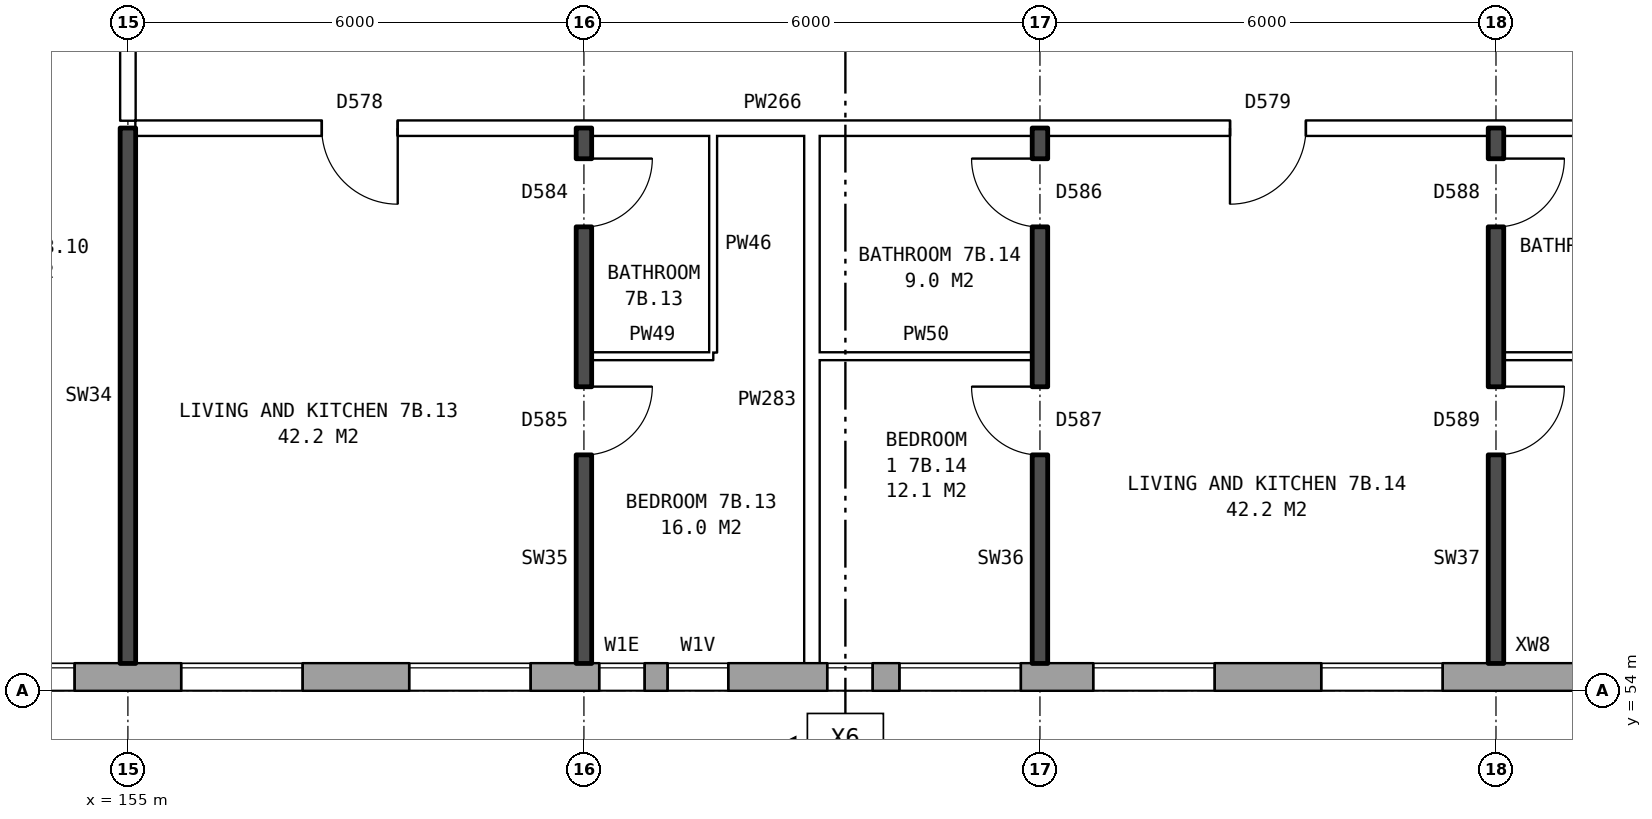
"""IFC4 building model, lengths in metres.
Left out: names, types, materials, properties, quantities, classifications, styles, units other than length and angle.
Written with IfcOpenShell. Run it as: python <this file> out.ifc"""

import sys

from ifc_helpers import new_model, si_unit, direction, frame, frame_2d, origin, place, context, subcontext, project, spatial, rectangle, extrude, element, fill, save


model = new_model("IFC4")
c1 = context("Model", 3, precision=1e-05, world=origin(), true_north=direction((0.0, 1.0)))
c2 = subcontext(c1, "Body", "Model", "MODEL_VIEW")
j1 = project(units=[si_unit("LENGTHUNIT", "METRE"), si_unit("PLANEANGLEUNIT", "RADIAN")], contexts=[c1])
p1 = place(None, origin())
s1 = spatial("IfcSite", under=j1, at=p1, CompositionType="ELEMENT")
p2 = place(p1, origin())
s2 = spatial("IfcBuilding", under=s1, at=p2, CompositionType="ELEMENT")
p3 = place(p2, frame((0.0, 0.0, 28.8)))
s3 = spatial("IfcBuildingStorey", under=s2, at=p3, CompositionType="ELEMENT", Elevation=28.8)
p4 = place(p3, frame((134.075, 54.18, 0.0), z_axis=(0.0, 0.0, 1.0), x_axis=(1.0, 0.0, 0.0)))
e1 = element("IfcWall", 1, at=p4, inside=s3, PredefinedType="STANDARD", context=c2, shape_type="SweptSolid", body=[
    extrude(rectangle(XDim=40.601, YDim=0.36, at=frame_2d((20.3, 0.0))), origin(), (0.0, 0.0, 1.0), 2.85),
])
p5 = place(p4, frame((0.625, 0.0, 0.8)))
e2 = element("IfcOpeningElement", 2, at=p5, cuts=e1, PredefinedType="OPENING", context=c2, shape_type="SweptSolid", body=[
    extrude(rectangle(XDim=1.6, YDim=1.8, at=frame_2d((0.8, 0.9))), frame((0.0, 0.19, 0.0), z_axis=(0.0, -1.0, 0.0), x_axis=(1.0, 0.0, 0.0)), (0.0, 0.0, 1.0), 0.38),
])
p6 = place(p4, frame((3.625, 0.0, 0.8)))
e3 = element("IfcOpeningElement", 3, at=p6, cuts=e1, PredefinedType="OPENING", context=c2, shape_type="SweptSolid", body=[
    extrude(rectangle(XDim=1.6, YDim=1.8, at=frame_2d((0.8, 0.9))), frame((0.0, 0.19, 0.0), z_axis=(0.0, -1.0, 0.0), x_axis=(1.0, 0.0, 0.0)), (0.0, 0.0, 1.0), 0.38),
])
p7 = place(p4, frame((6.625, 0.0, 0.8)))
e4 = element("IfcOpeningElement", 4, at=p7, cuts=e1, PredefinedType="OPENING", context=c2, shape_type="SweptSolid", body=[
    extrude(rectangle(XDim=1.6, YDim=1.8, at=frame_2d((0.8, 0.9))), frame((0.0, 0.19, 0.0), z_axis=(0.0, -1.0, 0.0), x_axis=(1.0, 0.0, 0.0)), (0.0, 0.0, 1.0), 0.38),
])
p8 = place(p4, frame((9.125, 0.0, 1.65)))
e5 = element("IfcOpeningElement", 5, at=p8, cuts=e1, PredefinedType="OPENING", context=c2, shape_type="SweptSolid", body=[
    extrude(rectangle(XDim=1.4, YDim=0.9, at=frame_2d((0.7, 0.45))), frame((0.0, 0.19, 0.0), z_axis=(0.0, -1.0, 0.0), x_axis=(1.0, 0.0, 0.0)), (0.0, 0.0, 1.0), 0.38),
])
p9 = place(p4, frame((12.075, 0.0, 0.8)))
e6 = element("IfcOpeningElement", 6, at=p9, cuts=e1, PredefinedType="OPENING", context=c2, shape_type="SweptSolid", body=[
    extrude(rectangle(XDim=0.6, YDim=0.9, at=frame_2d((0.3, 0.45))), frame((0.0, 0.19, 0.0), z_axis=(0.0, -1.0, 0.0), x_axis=(1.0, 0.0, 0.0)), (0.0, 0.0, 1.0), 0.38),
])
p10 = place(p4, frame((15.625, 0.0, 0.8)))
e7 = element("IfcOpeningElement", 7, at=p10, cuts=e1, PredefinedType="OPENING", context=c2, shape_type="SweptSolid", body=[
    extrude(rectangle(XDim=1.6, YDim=1.8, at=frame_2d((0.8, 0.9))), frame((0.0, 0.19, 0.0), z_axis=(0.0, -1.0, 0.0), x_axis=(1.0, 0.0, 0.0)), (0.0, 0.0, 1.0), 0.38),
])
p11 = place(p4, frame((18.625, 0.0, 0.8)))
e8 = element("IfcOpeningElement", 8, at=p11, cuts=e1, PredefinedType="OPENING", context=c2, shape_type="SweptSolid", body=[
    extrude(rectangle(XDim=1.6, YDim=1.8, at=frame_2d((0.8, 0.9))), frame((0.0, 0.19, 0.0), z_axis=(0.0, -1.0, 0.0), x_axis=(1.0, 0.0, 0.0)), (0.0, 0.0, 1.0), 0.38),
])
p12 = place(p4, frame((21.625, 0.0, 0.8)))
e9 = element("IfcOpeningElement", 9, at=p12, cuts=e1, PredefinedType="OPENING", context=c2, shape_type="SweptSolid", body=[
    extrude(rectangle(XDim=1.6, YDim=1.8, at=frame_2d((0.8, 0.9))), frame((0.0, 0.19, 0.0), z_axis=(0.0, -1.0, 0.0), x_axis=(1.0, 0.0, 0.0)), (0.0, 0.0, 1.0), 0.38),
])
p13 = place(p4, frame((24.625, 0.0, 0.8)))
e10 = element("IfcOpeningElement", 10, at=p13, cuts=e1, PredefinedType="OPENING", context=c2, shape_type="SweptSolid", body=[
    extrude(rectangle(XDim=1.6, YDim=1.8, at=frame_2d((0.8, 0.9))), frame((0.0, 0.19, 0.0), z_axis=(0.0, -1.0, 0.0), x_axis=(1.0, 0.0, 0.0)), (0.0, 0.0, 1.0), 0.38),
])
p14 = place(p4, frame((27.125, 0.0, 0.65)))
e11 = element("IfcOpeningElement", 11, at=p14, cuts=e1, PredefinedType="OPENING", context=c2, shape_type="SweptSolid", body=[
    extrude(rectangle(XDim=0.6, YDim=1.8, at=frame_2d((0.3, 0.9))), frame((0.0, 0.19, 0.0), z_axis=(0.0, -1.0, 0.0), x_axis=(1.0, 0.0, 0.0)), (0.0, 0.0, 1.0), 0.38),
])
p15 = place(p4, frame((30.125, 0.0, 1.6)))
e12 = element("IfcOpeningElement", 12, at=p15, cuts=e1, PredefinedType="OPENING", context=c2, shape_type="SweptSolid", body=[
    extrude(rectangle(XDim=0.6, YDim=0.9, at=frame_2d((0.3, 0.45))), frame((0.0, 0.19, 0.0), z_axis=(0.0, -1.0, 0.0), x_axis=(1.0, 0.0, 0.0)), (0.0, 0.0, 1.0), 0.38),
])
p16 = place(p4, frame((33.625, 0.0, 0.8)))
e13 = element("IfcOpeningElement", 13, at=p16, cuts=e1, PredefinedType="OPENING", context=c2, shape_type="SweptSolid", body=[
    extrude(rectangle(XDim=1.6, YDim=1.8, at=frame_2d((0.8, 0.9))), frame((0.0, 0.19, 0.0), z_axis=(0.0, -1.0, 0.0), x_axis=(1.0, 0.0, 0.0)), (0.0, 0.0, 1.0), 0.38),
])
p17 = place(p4, frame((36.625, 0.0, 0.8)))
e14 = element("IfcOpeningElement", 14, at=p17, cuts=e1, PredefinedType="OPENING", context=c2, shape_type="SweptSolid", body=[
    extrude(rectangle(XDim=1.6, YDim=1.8, at=frame_2d((0.8, 0.9))), frame((0.0, 0.19, 0.0), z_axis=(0.0, -1.0, 0.0), x_axis=(1.0, 0.0, 0.0)), (0.0, 0.0, 1.0), 0.38),
])
p18 = place(p4, frame((11.075, 0.0, 0.15)))
e15 = element("IfcOpeningElement", 15, at=p18, cuts=e1, PredefinedType="OPENING", context=c2, shape_type="SweptSolid", body=[
    extrude(rectangle(XDim=0.6, YDim=0.9, at=frame_2d((0.3, 0.45))), frame((0.0, 0.19, 0.0), z_axis=(0.0, -1.0, 0.0), x_axis=(1.0, 0.0, 0.0)), (0.0, 0.0, 1.0), 0.38),
])
p19 = place(p4, frame((13.025, 0.0, 0.8)))
e16 = element("IfcOpeningElement", 16, at=p19, cuts=e1, PredefinedType="OPENING", context=c2, shape_type="SweptSolid", body=[
    extrude(rectangle(XDim=1.6, YDim=1.8, at=frame_2d((0.8, 0.9))), frame((0.0, 0.19, 0.0), z_axis=(0.0, -1.0, 0.0), x_axis=(1.0, 0.0, 0.0)), (0.0, 0.0, 1.0), 0.38),
])
p20 = place(p4, frame((28.025, 0.0, 0.65)))
e17 = element("IfcOpeningElement", 17, at=p20, cuts=e1, PredefinedType="OPENING", context=c2, shape_type="SweptSolid", body=[
    extrude(rectangle(XDim=0.8, YDim=0.9, at=frame_2d((0.4, 0.45))), frame((0.0, 0.19, 0.0), z_axis=(0.0, -1.0, 0.0), x_axis=(1.0, 0.0, 0.0)), (0.0, 0.0, 1.0), 0.38),
])
p21 = place(p4, frame((31.075, 0.0, 0.8)))
e18 = element("IfcOpeningElement", 18, at=p21, cuts=e1, PredefinedType="OPENING", context=c2, shape_type="SweptSolid", body=[
    extrude(rectangle(XDim=1.6, YDim=1.8, at=frame_2d((0.8, 0.9))), frame((0.0, 0.19, 0.0), z_axis=(0.0, -1.0, 0.0), x_axis=(1.0, 0.0, 0.0)), (0.0, 0.0, 1.0), 0.38),
])
p22 = place(p3, frame((161.1, 58.4, 0.0), z_axis=(0.0, 0.0, 1.0), x_axis=(1.0, 0.0, 0.0)))
e19 = element("IfcWall", 19, at=p22, inside=s3, PredefinedType="PARTITIONING", context=c2, shape_type="SweptSolid", body=[
    extrude(rectangle(XDim=1.6, YDim=0.1, at=frame_2d((0.8, 0.0))), origin(), (0.0, 0.0, 1.0), 2.85),
])
p23 = place(p3, frame((164.1, 58.4, 0.0), z_axis=(0.0, 0.0, 1.0), x_axis=(1.0, 0.0, 0.0)))
e20 = element("IfcWall", 20, at=p23, inside=s3, PredefinedType="PARTITIONING", context=c2, shape_type="SweptSolid", body=[
    extrude(rectangle(XDim=2.8, YDim=0.1, at=frame_2d((1.4, 0.0))), origin(), (0.0, 0.0, 1.0), 2.85),
])
p24 = place(p3, frame((173.1, 58.4, 0.0), z_axis=(0.0, 0.0, 1.0), x_axis=(1.0, 0.0, 0.0)))
e21 = element("IfcWall", 21, at=p24, inside=s3, PredefinedType="PARTITIONING", context=c2, shape_type="SweptSolid", body=[
    extrude(rectangle(XDim=2.9, YDim=0.1, at=frame_2d((1.45, 0.0))), origin(), (0.0, 0.0, 1.0), 2.85),
])
p25 = place(p3, frame((155.1, 61.4, 0.0), z_axis=(0.0, 0.0, 1.0), x_axis=(1.0, 0.0, 0.0)))
e22 = element("IfcWall", 22, at=p25, inside=s3, PredefinedType="PARTITIONING", context=c2, shape_type="SweptSolid", body=[
    extrude(rectangle(XDim=22.29, YDim=0.2, at=frame_2d((11.145, 0.0))), origin(), (0.0, 0.0, 1.0), 2.85),
])
p26 = place(p25, frame((2.45, 0.0, 0.0)))
e23 = element("IfcOpeningElement", 23, at=p26, cuts=e22, PredefinedType="OPENING", context=c2, shape_type="SweptSolid", body=[
    extrude(rectangle(XDim=1.0, YDim=2.1, at=frame_2d((0.5, 1.05))), frame((0.0, 0.11, 0.0), z_axis=(0.0, -1.0, 0.0), x_axis=(1.0, 0.0, 0.0)), (0.0, 0.0, 1.0), 0.22),
])
p27 = place(p25, frame((14.4, 0.0, 0.0)))
e24 = element("IfcOpeningElement", 24, at=p27, cuts=e22, PredefinedType="OPENING", context=c2, shape_type="SweptSolid", body=[
    extrude(rectangle(XDim=1.0, YDim=2.1, at=frame_2d((0.5, 1.05))), frame((0.0, 0.11, 0.0), z_axis=(0.0, -1.0, 0.0), x_axis=(1.0, 0.0, 0.0)), (0.0, 0.0, 1.0), 0.22),
])
p28 = place(p3, frame((155.0, 54.36, 0.0), z_axis=(0.0, 0.0, 1.0), x_axis=(0.0, 1.0, 0.0)))
e25 = element("IfcWall", 25, at=p28, inside=s3, PredefinedType="SOLIDWALL", context=c2, shape_type="SweptSolid", body=[
    extrude(rectangle(XDim=7.04, YDim=0.2, at=frame_2d((3.52, 0.0))), origin(), (0.0, 0.0, 1.0), 2.85),
])
p29 = place(p3, frame((155.0, 61.5, 0.0), z_axis=(0.0, 0.0, 1.0), x_axis=(0.0, 1.0, 0.0)))
e26 = element("IfcWall", 26, at=p29, inside=s3, PredefinedType="PARTITIONING", context=c2, shape_type="SweptSolid", body=[
    extrude(rectangle(XDim=2.2, YDim=0.2, at=frame_2d((1.1, 0.0))), origin(), (0.0, 0.0, 1.0), 2.85),
])
p30 = place(p3, frame((161.0, 54.36, 0.0), z_axis=(0.0, 0.0, 1.0), x_axis=(0.0, 1.0, 0.0)))
e27 = element("IfcWall", 27, at=p30, inside=s3, PredefinedType="SOLIDWALL", context=c2, shape_type="SweptSolid", body=[
    extrude(rectangle(XDim=7.04, YDim=0.2, at=frame_2d((3.52, 0.0))), origin(), (0.0, 0.0, 1.0), 2.85),
])
p31 = place(p30, frame((2.74, 0.0, 0.0)))
e28 = element("IfcOpeningElement", 28, at=p31, cuts=e27, PredefinedType="OPENING", context=c2, shape_type="SweptSolid", body=[
    extrude(rectangle(XDim=0.9, YDim=2.1, at=frame_2d((0.45, 1.05))), frame((0.0, 0.11, 0.0), z_axis=(0.0, -1.0, 0.0), x_axis=(1.0, 0.0, 0.0)), (0.0, 0.0, 1.0), 0.22),
])
p32 = place(p30, frame((5.74, 0.0, 0.0)))
e29 = element("IfcOpeningElement", 29, at=p32, cuts=e27, PredefinedType="OPENING", context=c2, shape_type="SweptSolid", body=[
    extrude(rectangle(XDim=0.9, YDim=2.1, at=frame_2d((0.45, 1.05))), frame((0.0, 0.11, 0.0), z_axis=(0.0, -1.0, 0.0), x_axis=(1.0, 0.0, 0.0)), (0.0, 0.0, 1.0), 0.22),
])
p33 = place(p3, frame((162.7, 58.45, 0.0), z_axis=(0.0, 0.0, 1.0), x_axis=(0.0, 1.0, 0.0)))
e30 = element("IfcWall", 30, at=p33, inside=s3, PredefinedType="PARTITIONING", context=c2, shape_type="SweptSolid", body=[
    extrude(rectangle(XDim=2.85, YDim=0.1, at=frame_2d((1.425, 0.0))), origin(), (0.0, 0.0, 1.0), 2.85),
])
p34 = place(p3, frame((164.0, 54.36, 0.0), z_axis=(0.0, 0.0, 1.0), x_axis=(0.0, 1.0, 0.0)))
e31 = element("IfcWall", 31, at=p34, inside=s3, PredefinedType="PARTITIONING", context=c2, shape_type="SweptSolid", body=[
    extrude(rectangle(XDim=6.94, YDim=0.2, at=frame_2d((3.47, 0.0))), origin(), (0.0, 0.0, 1.0), 2.85),
])
p35 = place(p3, frame((167.0, 54.36, 0.0), z_axis=(0.0, 0.0, 1.0), x_axis=(0.0, 1.0, 0.0)))
e32 = element("IfcWall", 32, at=p35, inside=s3, PredefinedType="SOLIDWALL", context=c2, shape_type="SweptSolid", body=[
    extrude(rectangle(XDim=7.04, YDim=0.2, at=frame_2d((3.52, 0.0))), origin(), (0.0, 0.0, 1.0), 2.85),
])
p36 = place(p35, frame((2.74, 0.0, 0.0)))
e33 = element("IfcOpeningElement", 33, at=p36, cuts=e32, PredefinedType="OPENING", context=c2, shape_type="SweptSolid", body=[
    extrude(rectangle(XDim=0.9, YDim=2.1, at=frame_2d((0.45, 1.05))), frame((0.0, 0.11, 0.0), z_axis=(0.0, -1.0, 0.0), x_axis=(1.0, 0.0, 0.0)), (0.0, 0.0, 1.0), 0.22),
])
p37 = place(p35, frame((5.74, 0.0, 0.0)))
e34 = element("IfcOpeningElement", 34, at=p37, cuts=e32, PredefinedType="OPENING", context=c2, shape_type="SweptSolid", body=[
    extrude(rectangle(XDim=0.9, YDim=2.1, at=frame_2d((0.45, 1.05))), frame((0.0, 0.11, 0.0), z_axis=(0.0, -1.0, 0.0), x_axis=(1.0, 0.0, 0.0)), (0.0, 0.0, 1.0), 0.22),
])
p38 = place(p3, frame((173.0, 54.36, 0.0), z_axis=(0.0, 0.0, 1.0), x_axis=(0.0, 1.0, 0.0)))
e35 = element("IfcWall", 35, at=p38, inside=s3, PredefinedType="SOLIDWALL", context=c2, shape_type="SweptSolid", body=[
    extrude(rectangle(XDim=7.04, YDim=0.2, at=frame_2d((3.52, 0.0))), origin(), (0.0, 0.0, 1.0), 2.85),
])
p39 = place(p38, frame((2.74, 0.0, 0.0)))
e36 = element("IfcOpeningElement", 36, at=p39, cuts=e35, PredefinedType="OPENING", context=c2, shape_type="SweptSolid", body=[
    extrude(rectangle(XDim=0.9, YDim=2.1, at=frame_2d((0.45, 1.05))), frame((0.0, 0.11, 0.0), z_axis=(0.0, -1.0, 0.0), x_axis=(1.0, 0.0, 0.0)), (0.0, 0.0, 1.0), 0.22),
])
p40 = place(p38, frame((5.74, 0.0, 0.0)))
e37 = element("IfcOpeningElement", 37, at=p40, cuts=e35, PredefinedType="OPENING", context=c2, shape_type="SweptSolid", body=[
    extrude(rectangle(XDim=0.9, YDim=2.1, at=frame_2d((0.45, 1.05))), frame((0.0, 0.11, 0.0), z_axis=(0.0, -1.0, 0.0), x_axis=(1.0, 0.0, 0.0)), (0.0, 0.0, 1.0), 0.22),
])
p41 = place(p11, origin())
e38 = element("IfcWindow", 38, at=p41, inside=s3, PartitioningType="SINGLE_PANEL", PredefinedType="WINDOW", context=c2, shape_type="SweptSolid", body=[
    extrude(rectangle(XDim=1.6, YDim=1.8, at=frame_2d((0.8, 0.9))), frame((0.0, 0.15, 0.0), z_axis=(0.0, -1.0, 0.0), x_axis=(1.0, 0.0, 0.0)), (0.0, 0.0, 1.0), 0.06),
])
fill(e8, e38)
p42 = place(p12, origin())
e39 = element("IfcWindow", 39, at=p42, inside=s3, PartitioningType="SINGLE_PANEL", PredefinedType="WINDOW", context=c2, shape_type="SweptSolid", body=[
    extrude(rectangle(XDim=1.6, YDim=1.8, at=frame_2d((0.8, 0.9))), frame((0.0, 0.15, 0.0), z_axis=(0.0, -1.0, 0.0), x_axis=(1.0, 0.0, 0.0)), (0.0, 0.0, 1.0), 0.06),
])
fill(e9, e39)
p43 = place(p13, origin())
e40 = element("IfcWindow", 40, at=p43, inside=s3, PartitioningType="SINGLE_PANEL", PredefinedType="WINDOW", context=c2, shape_type="SweptSolid", body=[
    extrude(rectangle(XDim=1.6, YDim=1.8, at=frame_2d((0.8, 0.9))), frame((0.0, 0.15, 0.0), z_axis=(0.0, -1.0, 0.0), x_axis=(1.0, 0.0, 0.0)), (0.0, 0.0, 1.0), 0.06),
])
fill(e10, e40)
p44 = place(p14, origin())
e41 = element("IfcWindow", 41, at=p44, inside=s3, PartitioningType="SINGLE_PANEL", PredefinedType="WINDOW", context=c2, shape_type="SweptSolid", body=[
    extrude(rectangle(XDim=0.6, YDim=1.8, at=frame_2d((0.3, 0.9))), frame((0.0, 0.15, 0.0), z_axis=(0.0, -1.0, 0.0), x_axis=(1.0, 0.0, 0.0)), (0.0, 0.0, 1.0), 0.06),
])
fill(e11, e41)
p45 = place(p15, origin())
e42 = element("IfcWindow", 42, at=p45, inside=s3, PartitioningType="SINGLE_PANEL", PredefinedType="WINDOW", context=c2, shape_type="SweptSolid", body=[
    extrude(rectangle(XDim=0.6, YDim=0.9, at=frame_2d((0.3, 0.45))), frame((0.0, 0.15, 0.0), z_axis=(0.0, -1.0, 0.0), x_axis=(1.0, 0.0, 0.0)), (0.0, 0.0, 1.0), 0.06),
])
fill(e12, e42)
p46 = place(p16, origin())
e43 = element("IfcWindow", 43, at=p46, inside=s3, PartitioningType="SINGLE_PANEL", PredefinedType="WINDOW", context=c2, shape_type="SweptSolid", body=[
    extrude(rectangle(XDim=1.6, YDim=1.8, at=frame_2d((0.8, 0.9))), frame((0.0, 0.15, 0.0), z_axis=(0.0, -1.0, 0.0), x_axis=(1.0, 0.0, 0.0)), (0.0, 0.0, 1.0), 0.06),
])
fill(e13, e43)
p47 = place(p17, origin())
e44 = element("IfcWindow", 44, at=p47, inside=s3, PartitioningType="SINGLE_PANEL", PredefinedType="WINDOW", context=c2, shape_type="SweptSolid", body=[
    extrude(rectangle(XDim=1.6, YDim=1.8, at=frame_2d((0.8, 0.9))), frame((0.0, 0.15, 0.0), z_axis=(0.0, -1.0, 0.0), x_axis=(1.0, 0.0, 0.0)), (0.0, 0.0, 1.0), 0.06),
])
fill(e14, e44)
p48 = place(p31, frame((0.9, 0.0, 0.0), z_axis=(0.0, 0.0, 1.0), x_axis=(-1.0, 0.0, 0.0)))
e45 = element("IfcDoor", 45, at=p48, inside=s3, OperationType="SINGLE_SWING_LEFT", PredefinedType="DOOR", context=c2, shape_type="SweptSolid", body=[
    extrude(rectangle(XDim=0.9, YDim=2.1, at=frame_2d((0.45, 1.05))), frame((0.0, 0.025, 0.0), z_axis=(0.0, -1.0, 0.0), x_axis=(1.0, 0.0, 0.0)), (0.0, 0.0, 1.0), 0.05),
])
fill(e28, e45)
p49 = place(p26, frame((1.0, 0.0, 0.0), z_axis=(0.0, 0.0, 1.0), x_axis=(-1.0, 0.0, 0.0)))
e46 = element("IfcDoor", 46, at=p49, inside=s3, OperationType="SINGLE_SWING_LEFT", PredefinedType="DOOR", context=c2, shape_type="SweptSolid", body=[
    extrude(rectangle(XDim=1.0, YDim=2.1, at=frame_2d((0.5, 1.05))), frame((0.0, 0.025, 0.0), z_axis=(0.0, -1.0, 0.0), x_axis=(1.0, 0.0, 0.0)), (0.0, 0.0, 1.0), 0.05),
])
fill(e23, e46)
p50 = place(p32, frame((0.9, 0.0, 0.0), z_axis=(0.0, 0.0, 1.0), x_axis=(-1.0, 0.0, 0.0)))
e47 = element("IfcDoor", 47, at=p50, inside=s3, OperationType="SINGLE_SWING_LEFT", PredefinedType="DOOR", context=c2, shape_type="SweptSolid", body=[
    extrude(rectangle(XDim=0.9, YDim=2.1, at=frame_2d((0.45, 1.05))), frame((0.0, 0.025, 0.0), z_axis=(0.0, -1.0, 0.0), x_axis=(1.0, 0.0, 0.0)), (0.0, 0.0, 1.0), 0.05),
])
fill(e29, e47)
p51 = place(p36, origin())
e48 = element("IfcDoor", 48, at=p51, inside=s3, OperationType="SINGLE_SWING_RIGHT", PredefinedType="DOOR", context=c2, shape_type="SweptSolid", body=[
    extrude(rectangle(XDim=0.9, YDim=2.1, at=frame_2d((0.45, 1.05))), frame((0.0, 0.025, 0.0), z_axis=(0.0, -1.0, 0.0), x_axis=(1.0, 0.0, 0.0)), (0.0, 0.0, 1.0), 0.05),
])
fill(e33, e48)
p52 = place(p39, frame((0.9, 0.0, 0.0), z_axis=(0.0, 0.0, 1.0), x_axis=(-1.0, 0.0, 0.0)))
e49 = element("IfcDoor", 49, at=p52, inside=s3, OperationType="SINGLE_SWING_LEFT", PredefinedType="DOOR", context=c2, shape_type="SweptSolid", body=[
    extrude(rectangle(XDim=0.9, YDim=2.1, at=frame_2d((0.45, 1.05))), frame((0.0, 0.025, 0.0), z_axis=(0.0, -1.0, 0.0), x_axis=(1.0, 0.0, 0.0)), (0.0, 0.0, 1.0), 0.05),
])
fill(e36, e49)
p53 = place(p27, frame((1.0, 0.0, 0.0), z_axis=(0.0, 0.0, 1.0), x_axis=(-1.0, 0.0, 0.0)))
e50 = element("IfcDoor", 50, at=p53, inside=s3, OperationType="SINGLE_SWING_RIGHT", PredefinedType="DOOR", context=c2, shape_type="SweptSolid", body=[
    extrude(rectangle(XDim=1.0, YDim=2.1, at=frame_2d((0.5, 1.05))), frame((0.0, 0.025, 0.0), z_axis=(0.0, -1.0, 0.0), x_axis=(1.0, 0.0, 0.0)), (0.0, 0.0, 1.0), 0.05),
])
fill(e24, e50)
p54 = place(p37, origin())
e51 = element("IfcDoor", 51, at=p54, inside=s3, OperationType="SINGLE_SWING_RIGHT", PredefinedType="DOOR", context=c2, shape_type="SweptSolid", body=[
    extrude(rectangle(XDim=0.9, YDim=2.1, at=frame_2d((0.45, 1.05))), frame((0.0, 0.025, 0.0), z_axis=(0.0, -1.0, 0.0), x_axis=(1.0, 0.0, 0.0)), (0.0, 0.0, 1.0), 0.05),
])
fill(e34, e51)
p55 = place(p40, frame((0.9, 0.0, 0.0), z_axis=(0.0, 0.0, 1.0), x_axis=(-1.0, 0.0, 0.0)))
e52 = element("IfcDoor", 52, at=p55, inside=s3, OperationType="SINGLE_SWING_LEFT", PredefinedType="DOOR", context=c2, shape_type="SweptSolid", body=[
    extrude(rectangle(XDim=0.9, YDim=2.1, at=frame_2d((0.45, 1.05))), frame((0.0, 0.025, 0.0), z_axis=(0.0, -1.0, 0.0), x_axis=(1.0, 0.0, 0.0)), (0.0, 0.0, 1.0), 0.05),
])
fill(e37, e52)
p56 = place(p20, origin())
e53 = element("IfcWindow", 53, at=p56, inside=s3, PartitioningType="SINGLE_PANEL", PredefinedType="WINDOW", context=c2, shape_type="SweptSolid", body=[
    extrude(rectangle(XDim=0.8, YDim=0.9, at=frame_2d((0.4, 0.45))), frame((0.0, 0.15, 0.0), z_axis=(0.0, -1.0, 0.0), x_axis=(1.0, 0.0, 0.0)), (0.0, 0.0, 1.0), 0.06),
])
fill(e17, e53)
p57 = place(p21, origin())
e54 = element("IfcWindow", 54, at=p57, inside=s3, PartitioningType="SINGLE_PANEL", PredefinedType="WINDOW", context=c2, shape_type="SweptSolid", body=[
    extrude(rectangle(XDim=1.6, YDim=1.8, at=frame_2d((0.8, 0.9))), frame((0.0, 0.15, 0.0), z_axis=(0.0, -1.0, 0.0), x_axis=(1.0, 0.0, 0.0)), (0.0, 0.0, 1.0), 0.06),
])
fill(e18, e54)
save(model, sys.argv[1])
